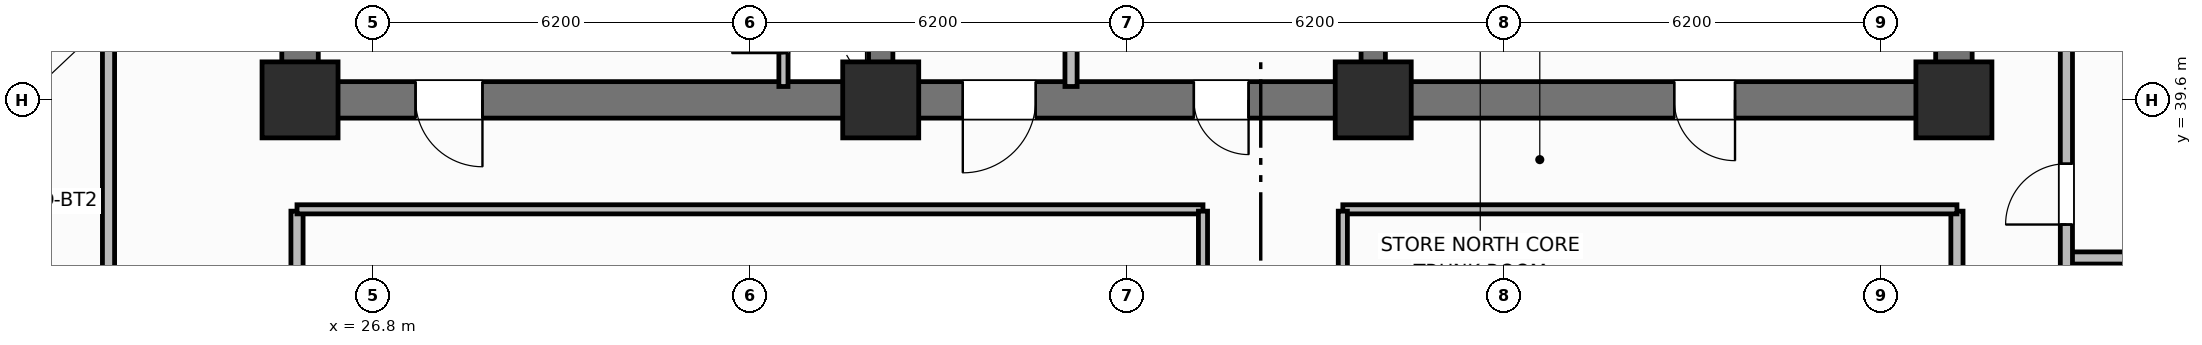
"""IFC4 building model, lengths in metres.
Left out: names, types, materials, properties, quantities, classifications, styles, units other than length and angle.
Written with IfcOpenShell. Run it as: python <this file> out.ifc"""

import sys

from ifc_helpers import new_model, si_unit, direction, frame, frame_2d, origin, origin_2d, place, context, subcontext, project, spatial, rectangle, extrude, element, fill, save


model = new_model("IFC4")
c1 = context("Model", 3, precision=1e-05, world=origin(), true_north=direction((0.0, 1.0)))
c2 = subcontext(c1, "Body", "Model", "MODEL_VIEW")
j1 = project(units=[si_unit("LENGTHUNIT", "METRE"), si_unit("PLANEANGLEUNIT", "RADIAN")], contexts=[c1])
p1 = place(None, origin())
s1 = spatial("IfcSite", under=j1, at=p1, CompositionType="ELEMENT")
p2 = place(p1, origin())
s2 = spatial("IfcBuilding", under=s1, at=p2, CompositionType="ELEMENT")
p3 = place(p2, frame((0.0, 0.0, 62.1)))
s3 = spatial("IfcBuildingStorey", under=s2, at=p3, CompositionType="ELEMENT", Elevation=62.1)
for number, where, z_axis, x_axis in (
    (1, (25.6, 39.9, 0.0), (0.0, 0.0, 1.0), (0.0, 1.0, 0.0)),
    (2, (52.8, 39.9, 0.0), (0.0, 0.0, 1.0), (0.0, 1.0, 0.0)),
):
    element("IfcWall", number, at=place(p3, frame(where, z_axis=z_axis, x_axis=x_axis)), inside=s3, PredefinedType="SHEAR", context=c2, shape_type="SweptSolid", body=[
        extrude(rectangle(XDim=5.6, YDim=0.6, at=frame_2d((2.8, 0.0))), origin(), (0.0, 0.0, 1.0), 3.7),
    ])
p4 = place(p3, frame((52.8, 39.6, 0.0), z_axis=(0.0, 0.0, 1.0), x_axis=(-1.0, 0.0, 0.0)))
e3 = element("IfcWall", 3, at=p4, inside=s3, PredefinedType="SHEAR", context=c2, shape_type="SweptSolid", body=[
    extrude(rectangle(XDim=27.2, YDim=0.6, at=frame_2d((13.6, 0.0))), origin(), (0.0, 0.0, 1.0), 3.7),
])
p5 = place(p4, frame((24.2, 0.0, 0.0)))
e4 = element("IfcOpeningElement", 4, at=p5, cuts=e3, PredefinedType="OPENING", context=c2, shape_type="SweptSolid", body=[
    extrude(rectangle(XDim=1.1, YDim=2.15, at=frame_2d((0.55, 1.075))), frame((0.0, 0.31, 0.0), z_axis=(0.0, -1.0, 0.0), x_axis=(1.0, 0.0, 0.0)), (0.0, 0.0, 1.0), 0.62),
])
p6 = place(p4, frame((15.1, 0.0, 0.0)))
e5 = element("IfcOpeningElement", 5, at=p6, cuts=e3, PredefinedType="OPENING", context=c2, shape_type="SweptSolid", body=[
    extrude(rectangle(XDim=1.2, YDim=2.15, at=frame_2d((0.6, 1.075))), frame((0.0, 0.31, 0.0), z_axis=(0.0, -1.0, 0.0), x_axis=(1.0, 0.0, 0.0)), (0.0, 0.0, 1.0), 0.62),
])
p7 = place(p4, frame((11.6, 0.0, 0.0)))
e6 = element("IfcOpeningElement", 6, at=p7, cuts=e3, PredefinedType="OPENING", context=c2, shape_type="SweptSolid", body=[
    extrude(rectangle(XDim=0.9, YDim=2.1, at=frame_2d((0.45, 1.05))), frame((0.0, 0.31, 0.0), z_axis=(0.0, -1.0, 0.0), x_axis=(1.0, 0.0, 0.0)), (0.0, 0.0, 1.0), 0.62),
])
p8 = place(p4, frame((3.6, 0.0, 0.0)))
e7 = element("IfcOpeningElement", 7, at=p8, cuts=e3, PredefinedType="OPENING", context=c2, shape_type="SweptSolid", body=[
    extrude(rectangle(XDim=1.0, YDim=2.15, at=frame_2d((0.5, 1.075))), frame((0.0, 0.31, 0.0), z_axis=(0.0, -1.0, 0.0), x_axis=(1.0, 0.0, 0.0)), (0.0, 0.0, 1.0), 0.62),
])
for number, where, z_axis, x_axis in (
    (8, (35.15, 39.9, 0.0), (0.0, 0.0, 1.0), (0.0, 1.0, 0.0)),
    (9, (43.25, 39.9, 0.0), (0.0, 0.0, 1.0), (0.0, 1.0, 0.0)),
):
    element("IfcWall", number, at=place(p3, frame(where, z_axis=z_axis, x_axis=x_axis)), inside=s3, PredefinedType="SHEAR", context=c2, shape_type="SweptSolid", body=[
        extrude(rectangle(XDim=5.6, YDim=0.4, at=frame_2d((2.8, 0.0))), origin(), (0.0, 0.0, 1.0), 3.7),
    ])
for number, where, z_axis, x_axis in (
    (10, (25.6, 39.6, 0.0), (0.0, 0.0, 1.0), (1.0, 0.0, 0.0)),
    (11, (35.15, 39.6, 0.0), (0.0, 0.0, 1.0), (1.0, 0.0, 0.0)),
    (12, (43.25, 39.6, 0.0), (0.0, 0.0, 1.0), (1.0, 0.0, 0.0)),
    (13, (52.8, 39.6, 0.0), (0.0, 0.0, 1.0), (1.0, 0.0, 0.0)),
):
    element("IfcColumn", number, at=place(p3, frame(where, z_axis=z_axis, x_axis=x_axis)), inside=s3, PredefinedType="COLUMN", context=c2, shape_type="SweptSolid", body=[
        extrude(rectangle(XDim=1.25, YDim=1.25, at=origin_2d()), origin(), (0.0, 0.0, 1.0), 3.7),
    ])
p9 = place(p3, frame((33.55, 39.82, 0.0), z_axis=(0.0, 0.0, 1.0), x_axis=(0.0, 1.0, 0.0)))
e14 = element("IfcWall", 14, at=p9, inside=s3, PredefinedType="PARTITIONING", context=c2, shape_type="SweptSolid", body=[
    extrude(rectangle(XDim=2.13, YDim=0.15, at=frame_2d((1.065, 0.0))), origin(), (0.0, 0.0, 1.0), 2.53),
])
p10 = place(p9, frame((0.55, 0.0, 0.0)))
e15 = element("IfcOpeningElement", 15, at=p10, cuts=e14, PredefinedType="OPENING", context=c2, shape_type="SweptSolid", body=[
    extrude(rectangle(XDim=0.85, YDim=2.05, at=frame_2d((0.425, 1.025))), frame((0.0, 0.085, 0.0), z_axis=(0.0, -1.0, 0.0), x_axis=(1.0, 0.0, 0.0)), (0.0, 0.0, 1.0), 0.17),
])
p11 = place(p3, frame((38.28, 39.82, 0.0), z_axis=(0.0, 0.0, 1.0), x_axis=(0.0, 1.0, 0.0)))
e16 = element("IfcWall", 16, at=p11, inside=s3, PredefinedType="PARTITIONING", context=c2, shape_type="SweptSolid", body=[
    extrude(rectangle(XDim=2.73, YDim=0.2, at=frame_2d((1.365, 0.0))), origin(), (0.0, 0.0, 1.0), 2.53),
])
for number, where, z_axis, x_axis in (
    (17, (25.55, 18.63, 0.0), (0.0, 0.0, 1.0), (0.0, 1.0, 0.0)),
    (18, (52.85, 18.63, 0.0), (0.0, 0.0, 1.0), (0.0, 1.0, 0.0)),
):
    element("IfcWall", number, at=place(p3, frame(where, z_axis=z_axis, x_axis=x_axis)), inside=s3, PredefinedType="PARTITIONING", context=c2, shape_type="SweptSolid", body=[
        extrude(rectangle(XDim=19.14, YDim=0.2, at=frame_2d((9.57, 0.0))), origin(), (0.0, 0.0, 1.0), 2.53),
    ])
p12 = place(p3, frame((25.55, 37.8, 0.0), z_axis=(0.0, 0.0, 1.0), x_axis=(1.0, 0.0, 0.0)))
e19 = element("IfcWall", 19, at=p12, inside=s3, PredefinedType="PARTITIONING", context=c2, shape_type="SweptSolid", body=[
    extrude(rectangle(XDim=14.9, YDim=0.15, at=frame_2d((7.45, 0.0))), origin(), (0.0, 0.0, 1.0), 2.53),
])
p13 = place(p3, frame((42.75, 37.8, 0.0), z_axis=(0.0, 0.0, 1.0), x_axis=(1.0, 0.0, 0.0)))
e20 = element("IfcWall", 20, at=p13, inside=s3, PredefinedType="PARTITIONING", context=c2, shape_type="SweptSolid", body=[
    extrude(rectangle(XDim=10.1, YDim=0.15, at=frame_2d((5.05, 0.0))), origin(), (0.0, 0.0, 1.0), 2.53),
])
p14 = place(p3, frame((40.45, 18.63, 0.0), z_axis=(0.0, 0.0, 1.0), x_axis=(0.0, 1.0, 0.0)))
e21 = element("IfcWall", 21, at=p14, inside=s3, PredefinedType="PARTITIONING", context=c2, shape_type="SweptSolid", body=[
    extrude(rectangle(XDim=19.14, YDim=0.15, at=frame_2d((9.57, 0.0))), origin(), (0.0, 0.0, 1.0), 2.53),
])
p15 = place(p14, frame((2.4, 0.0, 0.0)))
e22 = element("IfcOpeningElement", 22, at=p15, cuts=e21, PredefinedType="OPENING", context=c2, shape_type="SweptSolid", body=[
    extrude(rectangle(XDim=1.0, YDim=2.15, at=frame_2d((0.5, 1.075))), frame((0.0, 0.085, 0.0), z_axis=(0.0, -1.0, 0.0), x_axis=(1.0, 0.0, 0.0)), (0.0, 0.0, 1.0), 0.17),
])
p16 = place(p14, frame((11.4, 0.0, 0.0)))
e23 = element("IfcOpeningElement", 23, at=p16, cuts=e21, PredefinedType="OPENING", context=c2, shape_type="SweptSolid", body=[
    extrude(rectangle(XDim=1.0, YDim=2.15, at=frame_2d((0.5, 1.075))), frame((0.0, 0.085, 0.0), z_axis=(0.0, -1.0, 0.0), x_axis=(1.0, 0.0, 0.0)), (0.0, 0.0, 1.0), 0.17),
])
p17 = place(p3, frame((42.75, 18.63, 0.0), z_axis=(0.0, 0.0, 1.0), x_axis=(0.0, 1.0, 0.0)))
e24 = element("IfcWall", 24, at=p17, inside=s3, PredefinedType="PARTITIONING", context=c2, shape_type="SweptSolid", body=[
    extrude(rectangle(XDim=19.14, YDim=0.15, at=frame_2d((9.57, 0.0))), origin(), (0.0, 0.0, 1.0), 2.53),
])
p18 = place(p17, frame((5.5, 0.0, 0.0)))
e25 = element("IfcOpeningElement", 25, at=p18, cuts=e24, PredefinedType="OPENING", context=c2, shape_type="SweptSolid", body=[
    extrude(rectangle(XDim=1.0, YDim=2.15, at=frame_2d((0.5, 1.075))), frame((0.0, 0.085, 0.0), z_axis=(0.0, -1.0, 0.0), x_axis=(1.0, 0.0, 0.0)), (0.0, 0.0, 1.0), 0.17),
])
p19 = place(p3, frame((22.45, 10.6, 0.0), z_axis=(0.0, 0.0, 1.0), x_axis=(0.0, 1.0, 0.0)))
e26 = element("IfcWall", 26, at=p19, inside=s3, PredefinedType="PARTITIONING", context=c2, shape_type="SweptSolid", body=[
    extrude(rectangle(XDim=35.2, YDim=0.2, at=frame_2d((17.6, 0.0))), origin(), (0.0, 0.0, 1.0), 2.53),
])
p20 = place(p19, frame((2.65, 0.0, 0.0)))
e27 = element("IfcOpeningElement", 27, at=p20, cuts=e26, PredefinedType="OPENING", context=c2, shape_type="SweptSolid", body=[
    extrude(rectangle(XDim=1.0, YDim=2.15, at=frame_2d((0.5, 1.075))), frame((0.0, 0.11, 0.0), z_axis=(0.0, -1.0, 0.0), x_axis=(1.0, 0.0, 0.0)), (0.0, 0.0, 1.0), 0.22),
])
p21 = place(p19, frame((19.438, 0.0, 0.0)))
e28 = element("IfcOpeningElement", 28, at=p21, cuts=e26, PredefinedType="OPENING", context=c2, shape_type="SweptSolid", body=[
    extrude(rectangle(XDim=1.0, YDim=2.15, at=frame_2d((0.5, 1.075))), frame((0.0, 0.11, 0.0), z_axis=(0.0, -1.0, 0.0), x_axis=(1.0, 0.0, 0.0)), (0.0, 0.0, 1.0), 0.22),
])
p22 = place(p3, frame((54.65, 37.0, 0.0), z_axis=(0.0, 0.0, 1.0), x_axis=(1.0, 0.0, 0.0)))
e29 = element("IfcWall", 29, at=p22, inside=s3, PredefinedType="PARTITIONING", context=c2, shape_type="SweptSolid", body=[
    extrude(rectangle(XDim=9.18, YDim=0.2, at=frame_2d((4.59, 0.0))), origin(), (0.0, 0.0, 1.0), 2.53),
])
p23 = place(p3, frame((54.65, 10.6, 0.0), z_axis=(0.0, 0.0, 1.0), x_axis=(0.0, 1.0, 0.0)))
e30 = element("IfcWall", 30, at=p23, inside=s3, PredefinedType="PARTITIONING", context=c2, shape_type="SweptSolid", body=[
    extrude(rectangle(XDim=35.2, YDim=0.2, at=frame_2d((17.6, 0.0))), origin(), (0.0, 0.0, 1.0), 2.53),
])
p24 = place(p23, frame((2.65, 0.0, 0.0)))
e31 = element("IfcOpeningElement", 31, at=p24, cuts=e30, PredefinedType="OPENING", context=c2, shape_type="SweptSolid", body=[
    extrude(rectangle(XDim=1.0, YDim=2.15, at=frame_2d((0.5, 1.075))), frame((0.0, 0.11, 0.0), z_axis=(0.0, -1.0, 0.0), x_axis=(1.0, 0.0, 0.0)), (0.0, 0.0, 1.0), 0.22),
])
p25 = place(p23, frame((10.81, 0.0, 0.0)))
e32 = element("IfcOpeningElement", 32, at=p25, cuts=e30, PredefinedType="OPENING", context=c2, shape_type="SweptSolid", body=[
    extrude(rectangle(XDim=1.0, YDim=2.15, at=frame_2d((0.5, 1.075))), frame((0.0, 0.11, 0.0), z_axis=(0.0, -1.0, 0.0), x_axis=(1.0, 0.0, 0.0)), (0.0, 0.0, 1.0), 0.22),
])
p26 = place(p23, frame((19.54, 0.0, 0.0)))
e33 = element("IfcOpeningElement", 33, at=p26, cuts=e30, PredefinedType="OPENING", context=c2, shape_type="SweptSolid", body=[
    extrude(rectangle(XDim=1.0, YDim=2.15, at=frame_2d((0.5, 1.075))), frame((0.0, 0.11, 0.0), z_axis=(0.0, -1.0, 0.0), x_axis=(1.0, 0.0, 0.0)), (0.0, 0.0, 1.0), 0.22),
])
p27 = place(p23, frame((26.95, 0.0, 0.0)))
e34 = element("IfcOpeningElement", 34, at=p27, cuts=e30, PredefinedType="OPENING", context=c2, shape_type="SweptSolid", body=[
    extrude(rectangle(XDim=1.0, YDim=2.15, at=frame_2d((0.5, 1.075))), frame((0.0, 0.11, 0.0), z_axis=(0.0, -1.0, 0.0), x_axis=(1.0, 0.0, 0.0)), (0.0, 0.0, 1.0), 0.22),
])
p28 = place(p10, origin())
e35 = element("IfcDoor", 35, at=p28, inside=s3, OperationType="SINGLE_SWING_LEFT", PredefinedType="TRAPDOOR", context=c2, shape_type="SweptSolid", body=[
    extrude(rectangle(XDim=0.85, YDim=2.05, at=frame_2d((0.425, 1.025))), frame((0.0, 0.025, 0.0), z_axis=(0.0, -1.0, 0.0), x_axis=(1.0, 0.0, 0.0)), (0.0, 0.0, 1.0), 0.05),
])
fill(e15, e35)
p29 = place(p27, origin())
e36 = element("IfcDoor", 36, at=p29, inside=s3, OperationType="SINGLE_SWING_LEFT", PredefinedType="DOOR", context=c2, shape_type="SweptSolid", body=[
    extrude(rectangle(XDim=1.0, YDim=2.15, at=frame_2d((0.5, 1.075))), frame((0.0, 0.025, 0.0), z_axis=(0.0, -1.0, 0.0), x_axis=(1.0, 0.0, 0.0)), (0.0, 0.0, 1.0), 0.05),
])
fill(e34, e36)
p30 = place(p5, origin())
e37 = element("IfcDoor", 37, at=p30, inside=s3, OperationType="SINGLE_SWING_LEFT", PredefinedType="DOOR", context=c2, shape_type="SweptSolid", body=[
    extrude(rectangle(XDim=1.1, YDim=2.15, at=frame_2d((0.55, 1.075))), frame((0.0, 0.025, 0.0), z_axis=(0.0, -1.0, 0.0), x_axis=(1.0, 0.0, 0.0)), (0.0, 0.0, 1.0), 0.05),
])
fill(e4, e37)
p31 = place(p6, origin())
e38 = element("IfcDoor", 38, at=p31, inside=s3, OperationType="SINGLE_SWING_RIGHT", PredefinedType="DOOR", context=c2, shape_type="SweptSolid", body=[
    extrude(rectangle(XDim=1.2, YDim=2.15, at=frame_2d((0.6, 1.075))), frame((0.0, 0.025, 0.0), z_axis=(0.0, -1.0, 0.0), x_axis=(1.0, 0.0, 0.0)), (0.0, 0.0, 1.0), 0.05),
])
fill(e5, e38)
p32 = place(p7, origin())
e39 = element("IfcDoor", 39, at=p32, inside=s3, OperationType="SINGLE_SWING_LEFT", PredefinedType="DOOR", context=c2, shape_type="SweptSolid", body=[
    extrude(rectangle(XDim=0.9, YDim=2.1, at=frame_2d((0.45, 1.05))), frame((0.0, 0.025, 0.0), z_axis=(0.0, -1.0, 0.0), x_axis=(1.0, 0.0, 0.0)), (0.0, 0.0, 1.0), 0.05),
])
fill(e6, e39)
p33 = place(p8, origin())
e40 = element("IfcDoor", 40, at=p33, inside=s3, OperationType="SINGLE_SWING_LEFT", PredefinedType="DOOR", context=c2, shape_type="SweptSolid", body=[
    extrude(rectangle(XDim=1.0, YDim=2.15, at=frame_2d((0.5, 1.075))), frame((0.0, 0.025, 0.0), z_axis=(0.0, -1.0, 0.0), x_axis=(1.0, 0.0, 0.0)), (0.0, 0.0, 1.0), 0.05),
])
fill(e7, e40)
save(model, sys.argv[1])
